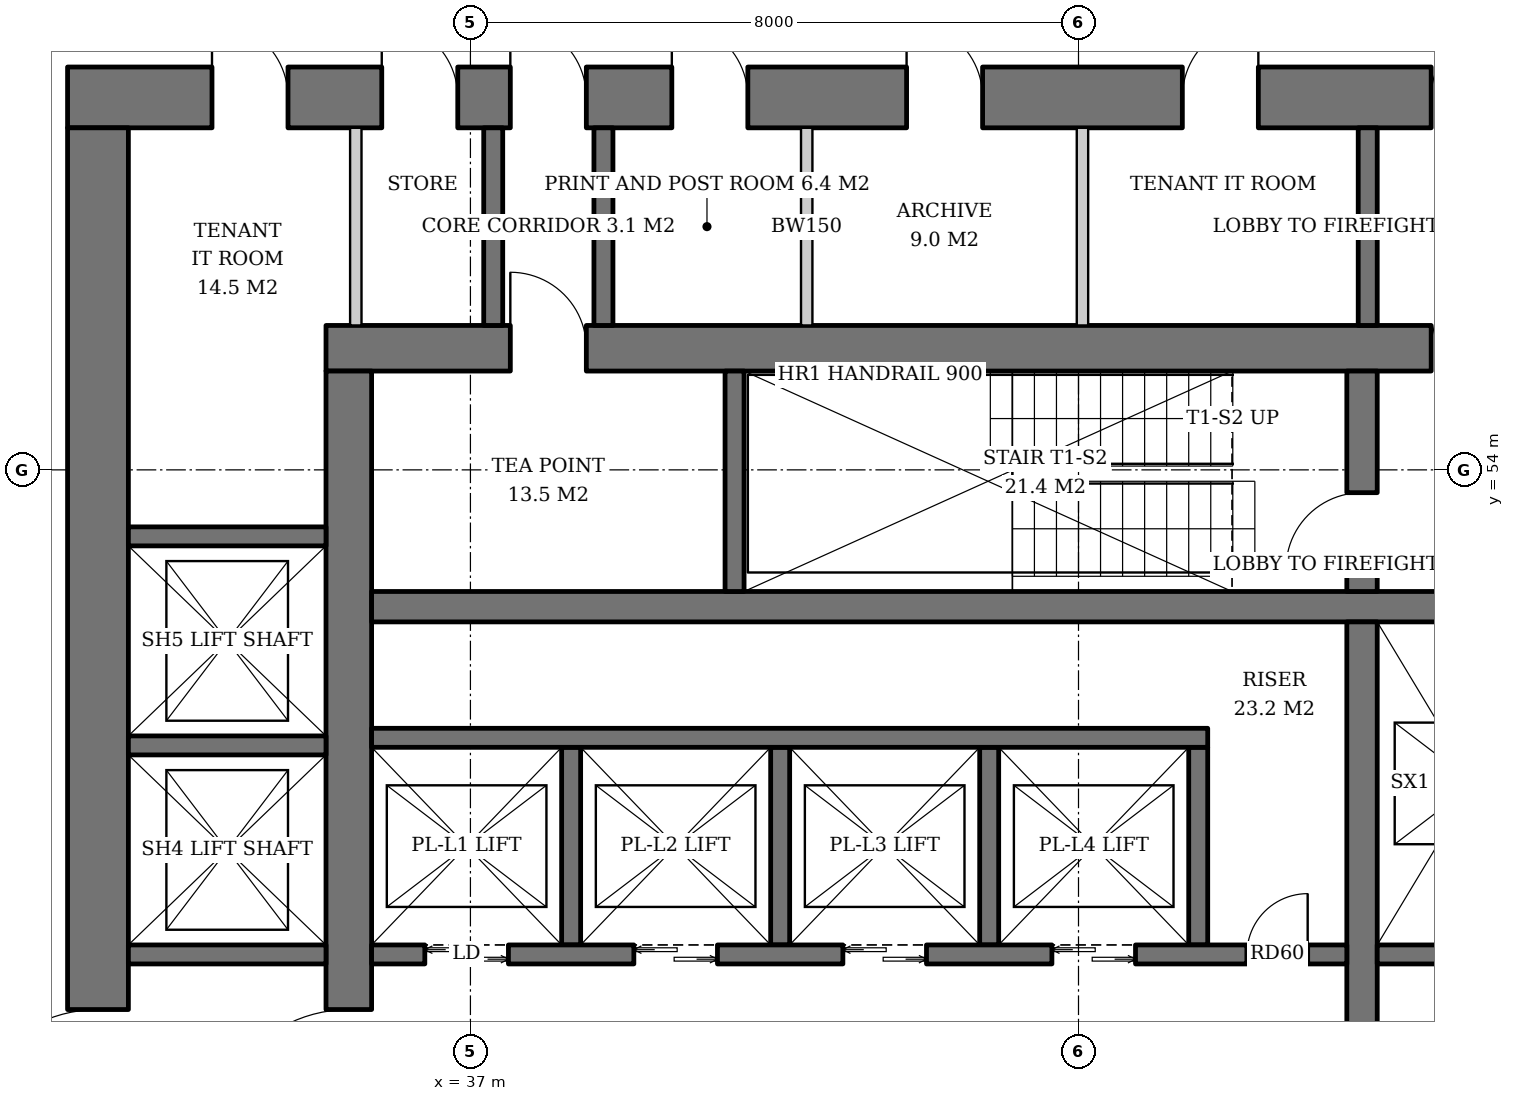
"""IFC4 building model, lengths in metres.
Left out: names, types, materials, properties, quantities, classifications, styles, units other than length and angle.
Written with IfcOpenShell. Run it as: python <this file> out.ifc"""

import sys

from ifc_helpers import new_model, si_unit, direction, frame, frame_2d, origin, place, context, subcontext, project, spatial, rectangle, extrude, element, fill, save


model = new_model("IFC4")
c1 = context("Model", 3, precision=1e-05, world=origin(), true_north=direction((0.0, 1.0)))
c2 = subcontext(c1, "Body", "Model", "MODEL_VIEW")
j1 = project(units=[si_unit("LENGTHUNIT", "METRE"), si_unit("PLANEANGLEUNIT", "RADIAN")], contexts=[c1])
p1 = place(None, origin())
s1 = spatial("IfcSite", under=j1, at=p1, CompositionType="ELEMENT")
p2 = place(p1, origin())
s2 = spatial("IfcBuilding", under=s1, at=p2, CompositionType="ELEMENT")
p3 = place(p2, frame((0.0, 0.0, 74.2)))
s3 = spatial("IfcBuildingStorey", under=s2, at=p3, CompositionType="ELEMENT", Elevation=74.2)
p4 = place(p3, frame((35.1, 55.6, 0.0), z_axis=(0.0, 0.0, 1.0), x_axis=(1.0, 0.0, 0.0)))
e1 = element("IfcWall", 1, at=p4, inside=s3, PredefinedType="SHEAR", context=c2, shape_type="SweptSolid", body=[
    extrude(rectangle(XDim=19.8, YDim=0.6, at=frame_2d((9.9, 0.0))), origin(), (0.0, 0.0, 1.0), 3.8),
])
p5 = place(p4, frame((14.54, 0.0, 0.0)))
e2 = element("IfcOpeningElement", 2, at=p5, cuts=e1, PredefinedType="OPENING", context=c2, shape_type="SweptSolid", body=[
    extrude(rectangle(XDim=1.0, YDim=2.1, at=frame_2d((0.5, 1.05))), frame((0.0, 0.31, 0.0), z_axis=(0.0, -1.0, 0.0), x_axis=(1.0, 0.0, 0.0)), (0.0, 0.0, 1.0), 0.62),
])
p6 = place(p4, frame((2.425, 0.0, 0.0)))
e3 = element("IfcOpeningElement", 3, at=p6, cuts=e1, PredefinedType="OPENING", context=c2, shape_type="SweptSolid", body=[
    extrude(rectangle(XDim=1.0, YDim=2.1, at=frame_2d((0.5, 1.05))), frame((0.0, 0.31, 0.0), z_axis=(0.0, -1.0, 0.0), x_axis=(1.0, 0.0, 0.0)), (0.0, 0.0, 1.0), 0.62),
])
p7 = place(p3, frame((35.4, 36.7, 0.0), z_axis=(0.0, 0.0, 1.0), x_axis=(0.0, 1.0, 0.0)))
e4 = element("IfcWall", 4, at=p7, inside=s3, PredefinedType="SHEAR", context=c2, shape_type="SweptSolid", body=[
    extrude(rectangle(XDim=18.6, YDim=0.6, at=frame_2d((9.3, 0.0))), origin(), (0.0, 0.0, 1.0), 3.8),
])
p8 = place(p7, frame((8.4, 0.0, 0.0)))
e5 = element("IfcOpeningElement", 5, at=p8, cuts=e4, PredefinedType="OPENING", context=c2, shape_type="SweptSolid", body=[
    extrude(rectangle(XDim=1.8, YDim=2.4, at=frame_2d((0.9, 1.2))), frame((0.0, 0.31, 0.0), z_axis=(0.0, -1.0, 0.0), x_axis=(1.0, 0.0, 0.0)), (0.0, 0.0, 1.0), 0.62),
])
p9 = place(p3, frame((31.7, 58.9, 0.0), z_axis=(0.0, 0.0, 1.0), x_axis=(1.0, 0.0, 0.0)))
e6 = element("IfcWall", 6, at=p9, inside=s3, PredefinedType="SHEAR", context=c2, shape_type="SweptSolid", body=[
    extrude(rectangle(XDim=26.6, YDim=0.8, at=frame_2d((13.3, 0.0))), origin(), (0.0, 0.0, 1.0), 3.8),
])
p10 = place(p9, frame((17.94, 0.0, 0.0)))
e7 = element("IfcOpeningElement", 7, at=p10, cuts=e6, PredefinedType="OPENING", context=c2, shape_type="SweptSolid", body=[
    extrude(rectangle(XDim=1.0, YDim=2.1, at=frame_2d((0.5, 1.05))), frame((0.0, 0.41, 0.0), z_axis=(0.0, -1.0, 0.0), x_axis=(1.0, 0.0, 0.0)), (0.0, 0.0, 1.0), 0.82),
])
p11 = place(p9, frame((5.825, 0.0, 0.0)))
e8 = element("IfcOpeningElement", 8, at=p11, cuts=e6, PredefinedType="OPENING", context=c2, shape_type="SweptSolid", body=[
    extrude(rectangle(XDim=1.0, YDim=2.1, at=frame_2d((0.5, 1.05))), frame((0.0, 0.41, 0.0), z_axis=(0.0, -1.0, 0.0), x_axis=(1.0, 0.0, 0.0)), (0.0, 0.0, 1.0), 0.82),
])
p12 = place(p9, frame((1.9, 0.0, 0.0)))
e9 = element("IfcOpeningElement", 9, at=p12, cuts=e6, PredefinedType="OPENING", context=c2, shape_type="SweptSolid", body=[
    extrude(rectangle(XDim=1.0, YDim=2.1, at=frame_2d((0.5, 1.05))), frame((0.0, 0.41, 0.0), z_axis=(0.0, -1.0, 0.0), x_axis=(1.0, 0.0, 0.0)), (0.0, 0.0, 1.0), 0.82),
])
p13 = place(p9, frame((4.134, 0.0, 0.0)))
e10 = element("IfcOpeningElement", 10, at=p13, cuts=e6, PredefinedType="OPENING", context=c2, shape_type="SweptSolid", body=[
    extrude(rectangle(XDim=1.0, YDim=2.1, at=frame_2d((0.5, 1.05))), frame((0.0, 0.41, 0.0), z_axis=(0.0, -1.0, 0.0), x_axis=(1.0, 0.0, 0.0)), (0.0, 0.0, 1.0), 0.82),
])
p14 = place(p9, frame((7.95, 0.0, 0.0)))
e11 = element("IfcOpeningElement", 11, at=p14, cuts=e6, PredefinedType="OPENING", context=c2, shape_type="SweptSolid", body=[
    extrude(rectangle(XDim=1.0, YDim=2.1, at=frame_2d((0.5, 1.05))), frame((0.0, 0.41, 0.0), z_axis=(0.0, -1.0, 0.0), x_axis=(1.0, 0.0, 0.0)), (0.0, 0.0, 1.0), 0.82),
])
p15 = place(p9, frame((11.038, 0.0, 0.0)))
e12 = element("IfcOpeningElement", 12, at=p15, cuts=e6, PredefinedType="OPENING", context=c2, shape_type="SweptSolid", body=[
    extrude(rectangle(XDim=1.0, YDim=2.1, at=frame_2d((0.5, 1.05))), frame((0.0, 0.41, 0.0), z_axis=(0.0, -1.0, 0.0), x_axis=(1.0, 0.0, 0.0)), (0.0, 0.0, 1.0), 0.82),
])
p16 = place(p9, frame((14.666, 0.0, 0.0)))
e13 = element("IfcOpeningElement", 13, at=p16, cuts=e6, PredefinedType="OPENING", context=c2, shape_type="SweptSolid", body=[
    extrude(rectangle(XDim=1.0, YDim=2.1, at=frame_2d((0.5, 1.05))), frame((0.0, 0.41, 0.0), z_axis=(0.0, -1.0, 0.0), x_axis=(1.0, 0.0, 0.0)), (0.0, 0.0, 1.0), 0.82),
])
p17 = place(p9, frame((20.875, 0.0, 0.0)))
e14 = element("IfcOpeningElement", 14, at=p17, cuts=e6, PredefinedType="OPENING", context=c2, shape_type="SweptSolid", body=[
    extrude(rectangle(XDim=1.0, YDim=2.1, at=frame_2d((0.5, 1.05))), frame((0.0, 0.41, 0.0), z_axis=(0.0, -1.0, 0.0), x_axis=(1.0, 0.0, 0.0)), (0.0, 0.0, 1.0), 0.82),
])
p18 = place(p9, frame((23.7, 0.0, 0.0)))
e15 = element("IfcOpeningElement", 15, at=p18, cuts=e6, PredefinedType="OPENING", context=c2, shape_type="SweptSolid", body=[
    extrude(rectangle(XDim=1.0, YDim=2.1, at=frame_2d((0.5, 1.05))), frame((0.0, 0.41, 0.0), z_axis=(0.0, -1.0, 0.0), x_axis=(1.0, 0.0, 0.0)), (0.0, 0.0, 1.0), 0.82),
])
p19 = place(p3, frame((32.1, 33.5, 0.0), z_axis=(0.0, 0.0, 1.0), x_axis=(0.0, 1.0, 0.0)))
e16 = element("IfcWall", 16, at=p19, inside=s3, PredefinedType="SHEAR", context=c2, shape_type="SweptSolid", body=[
    extrude(rectangle(XDim=25.0, YDim=0.8, at=frame_2d((12.5, 0.0))), origin(), (0.0, 0.0, 1.0), 3.8),
])
p20 = place(p19, frame((11.6, 0.0, 0.0)))
e17 = element("IfcOpeningElement", 17, at=p20, cuts=e16, PredefinedType="OPENING", context=c2, shape_type="SweptSolid", body=[
    extrude(rectangle(XDim=1.8, YDim=2.4, at=frame_2d((0.9, 1.2))), frame((0.0, 0.41, 0.0), z_axis=(0.0, -1.0, 0.0), x_axis=(1.0, 0.0, 0.0)), (0.0, 0.0, 1.0), 0.82),
])
p21 = place(p3, frame((35.7, 52.2, 0.0), z_axis=(0.0, 0.0, 1.0), x_axis=(1.0, 0.0, 0.0)))
e18 = element("IfcWall", 18, at=p21, inside=s3, PredefinedType="SHEAR", context=c2, shape_type="SweptSolid", body=[
    extrude(rectangle(XDim=18.6, YDim=0.4, at=frame_2d((9.3, 0.0))), origin(), (0.0, 0.0, 1.0), 3.8),
])
p22 = place(p3, frame((48.73, 40.0, 0.0), z_axis=(0.0, 0.0, 1.0), x_axis=(0.0, 1.0, 0.0)))
e19 = element("IfcWall", 19, at=p22, inside=s3, PredefinedType="SHEAR", context=c2, shape_type="SweptSolid", body=[
    extrude(rectangle(XDim=12.0, YDim=0.4, at=frame_2d((6.0, 0.0))), origin(), (0.0, 0.0, 1.0), 3.8),
])
p23 = place(p3, frame((48.73, 52.4, 0.0), z_axis=(0.0, 0.0, 1.0), x_axis=(0.0, 1.0, 0.0)))
e20 = element("IfcWall", 20, at=p23, inside=s3, PredefinedType="SHEAR", context=c2, shape_type="SweptSolid", body=[
    extrude(rectangle(XDim=2.9, YDim=0.4, at=frame_2d((1.45, 0.0))), origin(), (0.0, 0.0, 1.0), 3.8),
])
p24 = place(p23, frame((0.3, 0.0, 0.0)))
e21 = element("IfcOpeningElement", 21, at=p24, cuts=e20, PredefinedType="OPENING", context=c2, shape_type="SweptSolid", body=[
    extrude(rectangle(XDim=1.0, YDim=2.1, at=frame_2d((0.5, 1.05))), frame((0.0, 0.21, 0.0), z_axis=(0.0, -1.0, 0.0), x_axis=(1.0, 0.0, 0.0)), (0.0, 0.0, 1.0), 0.42),
])
p25 = place(p3, frame((40.475, 52.4, 0.0), z_axis=(0.0, 0.0, 1.0), x_axis=(0.0, 1.0, 0.0)))
e22 = element("IfcWall", 22, at=p25, inside=s3, PredefinedType="SHEAR", context=c2, shape_type="SweptSolid", body=[
    extrude(rectangle(XDim=2.9, YDim=0.25, at=frame_2d((1.45, 0.0))), origin(), (0.0, 0.0, 1.0), 3.8),
])
for number, where, z_axis, x_axis in (
    (23, (38.325, 47.75, 0.0), (0.0, 0.0, 1.0), (0.0, 1.0, 0.0)),
    (24, (41.075, 47.75, 0.0), (0.0, 0.0, 1.0), (0.0, 1.0, 0.0)),
    (25, (43.825, 47.75, 0.0), (0.0, 0.0, 1.0), (0.0, 1.0, 0.0)),
    (26, (46.575, 47.75, 0.0), (0.0, 0.0, 1.0), (0.0, 1.0, 0.0)),
):
    element("IfcWall", number, at=place(p3, frame(where, z_axis=z_axis, x_axis=x_axis)), inside=s3, PredefinedType="SHEAR", context=c2, shape_type="SweptSolid", body=[
        extrude(rectangle(XDim=2.6, YDim=0.25, at=frame_2d((1.3, 0.0))), origin(), (0.0, 0.0, 1.0), 3.8),
    ])
p26 = place(p3, frame((35.7, 50.475, 0.0), z_axis=(0.0, 0.0, 1.0), x_axis=(1.0, 0.0, 0.0)))
e27 = element("IfcWall", 27, at=p26, inside=s3, PredefinedType="SHEAR", context=c2, shape_type="SweptSolid", body=[
    extrude(rectangle(XDim=11.0, YDim=0.25, at=frame_2d((5.5, 0.0))), origin(), (0.0, 0.0, 1.0), 3.8),
])
p27 = place(p3, frame((35.7, 47.625, 0.0), z_axis=(0.0, 0.0, 1.0), x_axis=(1.0, 0.0, 0.0)))
e28 = element("IfcWall", 28, at=p27, inside=s3, PredefinedType="SHEAR", context=c2, shape_type="SweptSolid", body=[
    extrude(rectangle(XDim=12.83, YDim=0.25, at=frame_2d((6.415, 0.0))), origin(), (0.0, 0.0, 1.0), 3.8),
])
p28 = place(p27, frame((0.7, 0.0, 0.0)))
e29 = element("IfcOpeningElement", 29, at=p28, cuts=e28, PredefinedType="OPENING", context=c2, shape_type="SweptSolid", body=[
    extrude(rectangle(XDim=1.1, YDim=2.2, at=frame_2d((0.55, 1.1))), frame((0.0, 0.135, 0.0), z_axis=(0.0, -1.0, 0.0), x_axis=(1.0, 0.0, 0.0)), (0.0, 0.0, 1.0), 0.27),
])
p29 = place(p27, frame((3.45, 0.0, 0.0)))
e30 = element("IfcOpeningElement", 30, at=p29, cuts=e28, PredefinedType="OPENING", context=c2, shape_type="SweptSolid", body=[
    extrude(rectangle(XDim=1.1, YDim=2.2, at=frame_2d((0.55, 1.1))), frame((0.0, 0.135, 0.0), z_axis=(0.0, -1.0, 0.0), x_axis=(1.0, 0.0, 0.0)), (0.0, 0.0, 1.0), 0.27),
])
p30 = place(p27, frame((6.2, 0.0, 0.0)))
e31 = element("IfcOpeningElement", 31, at=p30, cuts=e28, PredefinedType="OPENING", context=c2, shape_type="SweptSolid", body=[
    extrude(rectangle(XDim=1.1, YDim=2.2, at=frame_2d((0.55, 1.1))), frame((0.0, 0.135, 0.0), z_axis=(0.0, -1.0, 0.0), x_axis=(1.0, 0.0, 0.0)), (0.0, 0.0, 1.0), 0.27),
])
p31 = place(p27, frame((8.95, 0.0, 0.0)))
e32 = element("IfcOpeningElement", 32, at=p31, cuts=e28, PredefinedType="OPENING", context=c2, shape_type="SweptSolid", body=[
    extrude(rectangle(XDim=1.1, YDim=2.2, at=frame_2d((0.55, 1.1))), frame((0.0, 0.135, 0.0), z_axis=(0.0, -1.0, 0.0), x_axis=(1.0, 0.0, 0.0)), (0.0, 0.0, 1.0), 0.27),
])
p32 = place(p27, frame((11.515, 0.0, 0.0)))
e33 = element("IfcOpeningElement", 33, at=p32, cuts=e28, PredefinedType="OPENING", context=c2, shape_type="SweptSolid", body=[
    extrude(rectangle(XDim=0.8, YDim=2.0, at=frame_2d((0.4, 1.0))), frame((0.0, 0.135, 0.0), z_axis=(0.0, -1.0, 0.0), x_axis=(1.0, 0.0, 0.0)), (0.0, 0.0, 1.0), 0.27),
])
p33 = place(p3, frame((48.93, 47.625, 0.0), z_axis=(0.0, 0.0, 1.0), x_axis=(1.0, 0.0, 0.0)))
e34 = element("IfcWall", 34, at=p33, inside=s3, PredefinedType="SHEAR", context=c2, shape_type="SweptSolid", body=[
    extrude(rectangle(XDim=5.37, YDim=0.25, at=frame_2d((2.685, 0.0))), origin(), (0.0, 0.0, 1.0), 3.8),
])
for number, where, z_axis, x_axis in (
    (35, (32.5, 47.625, 0.0), (0.0, 0.0, 1.0), (1.0, 0.0, 0.0)),
    (36, (32.5, 50.375, 0.0), (0.0, 0.0, 1.0), (1.0, 0.0, 0.0)),
    (37, (32.5, 53.125, 0.0), (0.0, 0.0, 1.0), (1.0, 0.0, 0.0)),
):
    element("IfcWall", number, at=place(p3, frame(where, z_axis=z_axis, x_axis=x_axis)), inside=s3, PredefinedType="SHEAR", context=c2, shape_type="SweptSolid", body=[
        extrude(rectangle(XDim=2.6, YDim=0.25, at=frame_2d((1.3, 0.0))), origin(), (0.0, 0.0, 1.0), 3.8),
    ])
for number, where, z_axis, x_axis in (
    (38, (48.805, 55.9, 0.0), (0.0, 0.0, 1.0), (0.0, 1.0, 0.0)),
    (39, (37.3, 55.9, 0.0), (0.0, 0.0, 1.0), (0.0, 1.0, 0.0)),
    (40, (38.75, 55.9, 0.0), (0.0, 0.0, 1.0), (0.0, 1.0, 0.0)),
):
    element("IfcWall", number, at=place(p3, frame(where, z_axis=z_axis, x_axis=x_axis)), inside=s3, PredefinedType="SOLIDWALL", context=c2, shape_type="SweptSolid", body=[
        extrude(rectangle(XDim=2.6, YDim=0.25, at=frame_2d((1.3, 0.0))), origin(), (0.0, 0.0, 1.0), 3.62),
    ])
for number, where, z_axis, x_axis in (
    (41, (35.492, 55.9, 0.0), (0.0, 0.0, 1.0), (0.0, 1.0, 0.0)),
    (42, (41.424, 55.9, 0.0), (0.0, 0.0, 1.0), (0.0, 1.0, 0.0)),
    (43, (45.052, 55.9, 0.0), (0.0, 0.0, 1.0), (0.0, 1.0, 0.0)),
):
    element("IfcWall", number, at=place(p3, frame(where, z_axis=z_axis, x_axis=x_axis)), inside=s3, PredefinedType="SOLIDWALL", context=c2, shape_type="SweptSolid", body=[
        extrude(rectangle(XDim=2.6, YDim=0.15, at=frame_2d((1.3, 0.0))), origin(), (0.0, 0.0, 1.0), 3.62),
    ])
p34 = place(p28, origin())
e44 = element("IfcDoor", 44, at=p34, inside=s3, OperationType="DOUBLE_DOOR_SLIDING", PredefinedType="DOOR", context=c2, shape_type="SweptSolid", body=[
    extrude(rectangle(XDim=1.1, YDim=2.2, at=frame_2d((0.55, 1.1))), frame((0.0, 0.025, 0.0), z_axis=(0.0, -1.0, 0.0), x_axis=(1.0, 0.0, 0.0)), (0.0, 0.0, 1.0), 0.05),
])
fill(e29, e44)
p35 = place(p29, origin())
e45 = element("IfcDoor", 45, at=p35, inside=s3, OperationType="DOUBLE_DOOR_SLIDING", PredefinedType="DOOR", context=c2, shape_type="SweptSolid", body=[
    extrude(rectangle(XDim=1.1, YDim=2.2, at=frame_2d((0.55, 1.1))), frame((0.0, 0.025, 0.0), z_axis=(0.0, -1.0, 0.0), x_axis=(1.0, 0.0, 0.0)), (0.0, 0.0, 1.0), 0.05),
])
fill(e30, e45)
p36 = place(p30, origin())
e46 = element("IfcDoor", 46, at=p36, inside=s3, OperationType="DOUBLE_DOOR_SLIDING", PredefinedType="DOOR", context=c2, shape_type="SweptSolid", body=[
    extrude(rectangle(XDim=1.1, YDim=2.2, at=frame_2d((0.55, 1.1))), frame((0.0, 0.025, 0.0), z_axis=(0.0, -1.0, 0.0), x_axis=(1.0, 0.0, 0.0)), (0.0, 0.0, 1.0), 0.05),
])
fill(e31, e46)
p37 = place(p31, origin())
e47 = element("IfcDoor", 47, at=p37, inside=s3, OperationType="DOUBLE_DOOR_SLIDING", PredefinedType="DOOR", context=c2, shape_type="SweptSolid", body=[
    extrude(rectangle(XDim=1.1, YDim=2.2, at=frame_2d((0.55, 1.1))), frame((0.0, 0.025, 0.0), z_axis=(0.0, -1.0, 0.0), x_axis=(1.0, 0.0, 0.0)), (0.0, 0.0, 1.0), 0.05),
])
fill(e32, e47)
p38 = place(p32, origin())
e48 = element("IfcDoor", 48, at=p38, inside=s3, OperationType="SINGLE_SWING_RIGHT", PredefinedType="DOOR", context=c2, shape_type="SweptSolid", body=[
    extrude(rectangle(XDim=0.8, YDim=2.0, at=frame_2d((0.4, 1.0))), frame((0.0, 0.025, 0.0), z_axis=(0.0, -1.0, 0.0), x_axis=(1.0, 0.0, 0.0)), (0.0, 0.0, 1.0), 0.05),
])
fill(e33, e48)
p39 = place(p24, origin())
e49 = element("IfcDoor", 49, at=p39, inside=s3, OperationType="SINGLE_SWING_LEFT", PredefinedType="DOOR", context=c2, shape_type="SweptSolid", body=[
    extrude(rectangle(XDim=1.0, YDim=2.1, at=frame_2d((0.5, 1.05))), frame((0.0, 0.025, 0.0), z_axis=(0.0, -1.0, 0.0), x_axis=(1.0, 0.0, 0.0)), (0.0, 0.0, 1.0), 0.05),
])
fill(e21, e49)
p40 = place(p5, origin())
e50 = element("IfcDoor", 50, at=p40, inside=s3, OperationType="SINGLE_SWING_RIGHT", PredefinedType="DOOR", context=c2, shape_type="SweptSolid", body=[
    extrude(rectangle(XDim=1.0, YDim=2.1, at=frame_2d((0.5, 1.05))), frame((0.0, 0.025, 0.0), z_axis=(0.0, -1.0, 0.0), x_axis=(1.0, 0.0, 0.0)), (0.0, 0.0, 1.0), 0.05),
])
fill(e2, e50)
p41 = place(p8, origin())
e51 = element("IfcDoor", 51, at=p41, inside=s3, OperationType="DOUBLE_DOOR_SINGLE_SWING", PredefinedType="DOOR", context=c2, shape_type="SweptSolid", body=[
    extrude(rectangle(XDim=1.8, YDim=2.4, at=frame_2d((0.9, 1.2))), frame((0.0, 0.025, 0.0), z_axis=(0.0, -1.0, 0.0), x_axis=(1.0, 0.0, 0.0)), (0.0, 0.0, 1.0), 0.05),
])
fill(e5, e51)
p42 = place(p20, origin())
e52 = element("IfcDoor", 52, at=p42, inside=s3, OperationType="DOUBLE_DOOR_SINGLE_SWING", PredefinedType="DOOR", context=c2, shape_type="SweptSolid", body=[
    extrude(rectangle(XDim=1.8, YDim=2.4, at=frame_2d((0.9, 1.2))), frame((0.0, 0.025, 0.0), z_axis=(0.0, -1.0, 0.0), x_axis=(1.0, 0.0, 0.0)), (0.0, 0.0, 1.0), 0.05),
])
fill(e17, e52)
p43 = place(p10, origin())
e53 = element("IfcDoor", 53, at=p43, inside=s3, OperationType="SINGLE_SWING_RIGHT", PredefinedType="DOOR", context=c2, shape_type="SweptSolid", body=[
    extrude(rectangle(XDim=1.0, YDim=2.1, at=frame_2d((0.5, 1.05))), frame((0.0, 0.025, 0.0), z_axis=(0.0, -1.0, 0.0), x_axis=(1.0, 0.0, 0.0)), (0.0, 0.0, 1.0), 0.05),
])
fill(e7, e53)
p44 = place(p11, origin())
e54 = element("IfcDoor", 54, at=p44, inside=s3, OperationType="SINGLE_SWING_LEFT", PredefinedType="DOOR", context=c2, shape_type="SweptSolid", body=[
    extrude(rectangle(XDim=1.0, YDim=2.1, at=frame_2d((0.5, 1.05))), frame((0.0, 0.025, 0.0), z_axis=(0.0, -1.0, 0.0), x_axis=(1.0, 0.0, 0.0)), (0.0, 0.0, 1.0), 0.05),
])
fill(e8, e54)
p45 = place(p6, origin())
e55 = element("IfcDoor", 55, at=p45, inside=s3, OperationType="SINGLE_SWING_LEFT", PredefinedType="DOOR", context=c2, shape_type="SweptSolid", body=[
    extrude(rectangle(XDim=1.0, YDim=2.1, at=frame_2d((0.5, 1.05))), frame((0.0, -0.24, 0.0), z_axis=(0.0, -1.0, 0.0), x_axis=(1.0, 0.0, 0.0)), (0.0, 0.0, 1.0), 0.05),
])
fill(e3, e55)
p46 = place(p12, origin())
e56 = element("IfcDoor", 56, at=p46, inside=s3, OperationType="SINGLE_SWING_LEFT", PredefinedType="DOOR", context=c2, shape_type="SweptSolid", body=[
    extrude(rectangle(XDim=1.0, YDim=2.1, at=frame_2d((0.5, 1.05))), frame((0.0, -0.34, 0.0), z_axis=(0.0, -1.0, 0.0), x_axis=(1.0, 0.0, 0.0)), (0.0, 0.0, 1.0), 0.05),
])
fill(e9, e56)
p47 = place(p13, origin())
e57 = element("IfcDoor", 57, at=p47, inside=s3, OperationType="SINGLE_SWING_LEFT", PredefinedType="DOOR", context=c2, shape_type="SweptSolid", body=[
    extrude(rectangle(XDim=1.0, YDim=2.1, at=frame_2d((0.5, 1.05))), frame((0.0, -0.34, 0.0), z_axis=(0.0, -1.0, 0.0), x_axis=(1.0, 0.0, 0.0)), (0.0, 0.0, 1.0), 0.05),
])
fill(e10, e57)
p48 = place(p14, origin())
e58 = element("IfcDoor", 58, at=p48, inside=s3, OperationType="SINGLE_SWING_LEFT", PredefinedType="DOOR", context=c2, shape_type="SweptSolid", body=[
    extrude(rectangle(XDim=1.0, YDim=2.1, at=frame_2d((0.5, 1.05))), frame((0.0, -0.34, 0.0), z_axis=(0.0, -1.0, 0.0), x_axis=(1.0, 0.0, 0.0)), (0.0, 0.0, 1.0), 0.05),
])
fill(e11, e58)
p49 = place(p15, origin())
e59 = element("IfcDoor", 59, at=p49, inside=s3, OperationType="SINGLE_SWING_LEFT", PredefinedType="DOOR", context=c2, shape_type="SweptSolid", body=[
    extrude(rectangle(XDim=1.0, YDim=2.1, at=frame_2d((0.5, 1.05))), frame((0.0, -0.34, 0.0), z_axis=(0.0, -1.0, 0.0), x_axis=(1.0, 0.0, 0.0)), (0.0, 0.0, 1.0), 0.05),
])
fill(e12, e59)
p50 = place(p16, origin())
e60 = element("IfcDoor", 60, at=p50, inside=s3, OperationType="SINGLE_SWING_RIGHT", PredefinedType="DOOR", context=c2, shape_type="SweptSolid", body=[
    extrude(rectangle(XDim=1.0, YDim=2.1, at=frame_2d((0.5, 1.05))), frame((0.0, -0.34, 0.0), z_axis=(0.0, -1.0, 0.0), x_axis=(1.0, 0.0, 0.0)), (0.0, 0.0, 1.0), 0.05),
])
fill(e13, e60)
save(model, sys.argv[1])
